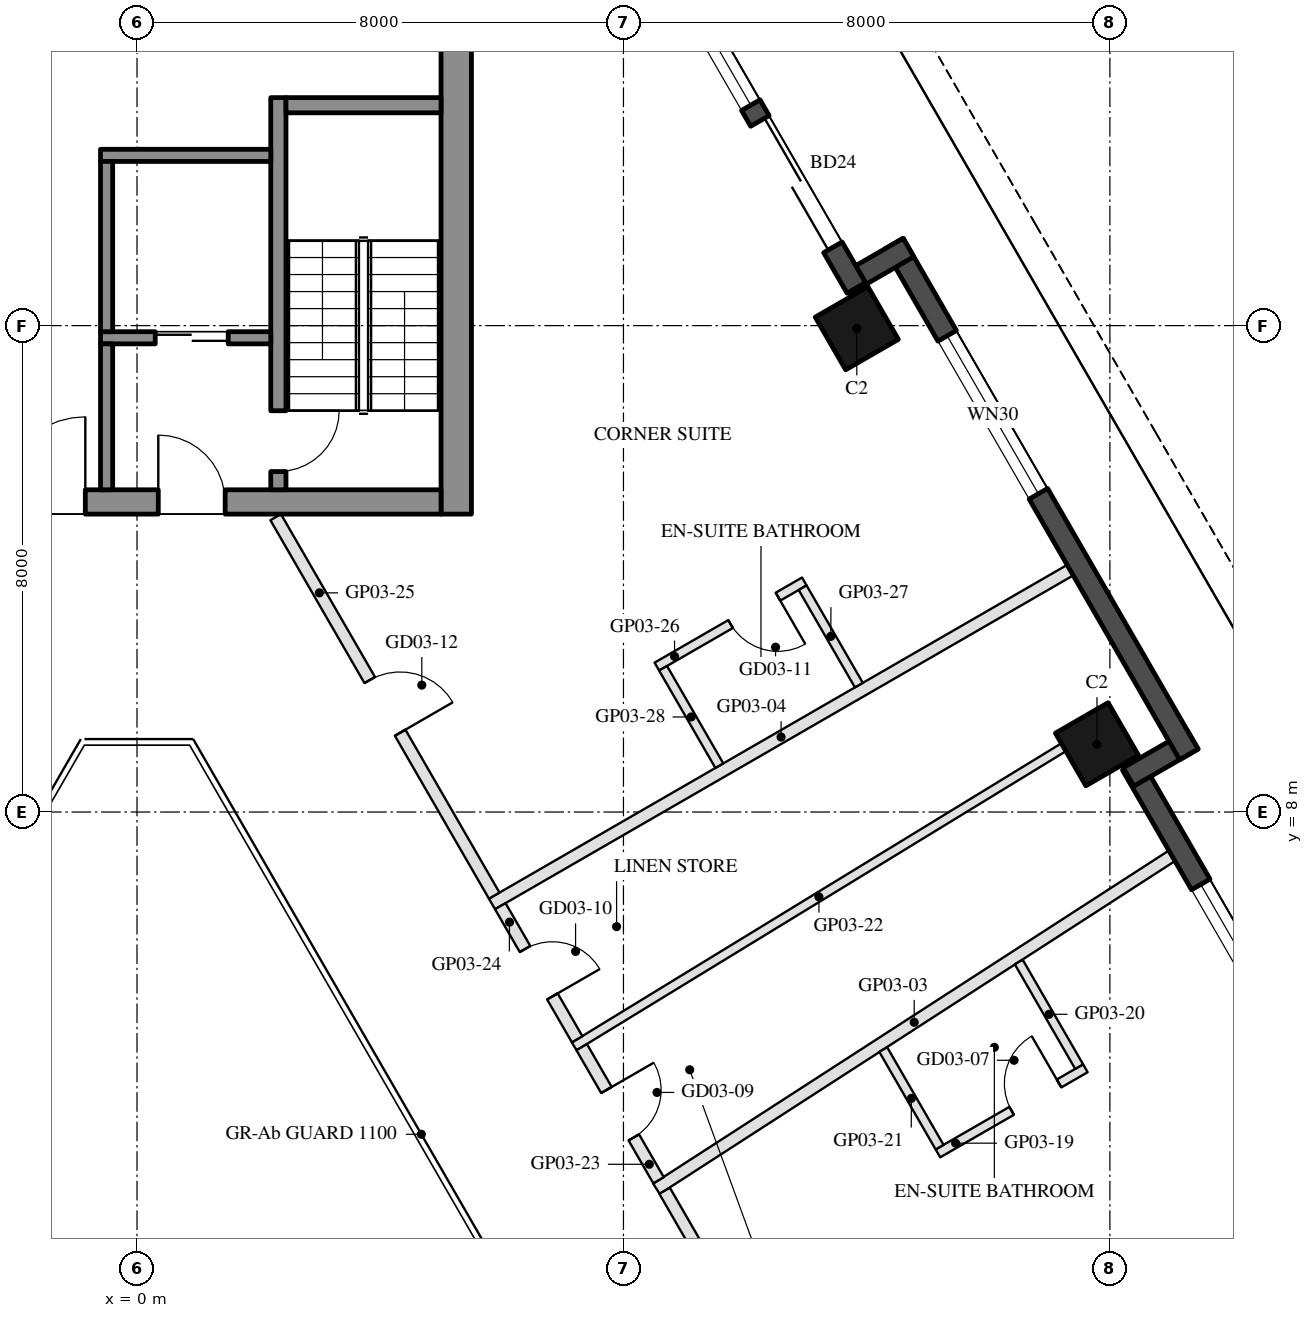
"""IFC4 building model, lengths in metres.
Left out: names, types, materials, properties, quantities, classifications, styles, units other than length and angle.
Written with IfcOpenShell. Run it as: python <this file> out.ifc"""

import sys

from ifc_helpers import new_model, si_unit, direction, frame, frame_2d, origin, origin_2d, place, context, subcontext, project, spatial, rectangle, hollow_rectangle, extrude, element, fill, save


model = new_model("IFC4")
c1 = context("Model", 3, precision=1e-05, world=origin(), true_north=direction((0.0, 1.0)))
c2 = subcontext(c1, "Body", "Model", "MODEL_VIEW")
j1 = project(units=[si_unit("LENGTHUNIT", "METRE"), si_unit("PLANEANGLEUNIT", "RADIAN")], contexts=[c1])
p1 = place(None, origin())
s1 = spatial("IfcSite", under=j1, at=p1, CompositionType="ELEMENT")
p2 = place(p1, origin())
s2 = spatial("IfcBuilding", under=s1, at=p2, CompositionType="ELEMENT")
p3 = place(p2, frame((0.0, 0.0, 65.0)))
s3 = spatial("IfcBuildingStorey", under=s2, at=p3, CompositionType="ELEMENT", Elevation=65.0)
for number, where, z_axis, x_axis in (
    (1, (15.788, 9.115, 0.0), (0.0, 0.0, 1.0), (-0.5, 0.866, 0.0)),
    (2, (11.838, 15.957, 0.0), (0.0, 0.0, 1.0), (-0.5, 0.866, 0.0)),
):
    element("IfcColumn", number, at=place(p3, frame(where, z_axis=z_axis, x_axis=x_axis)), inside=s3, PredefinedType="COLUMN", context=c2, shape_type="SweptSolid", body=[
        extrude(hollow_rectangle(XDim=1.0, YDim=1.0, WallThickness=0.045, at=origin_2d()), origin(), (0.0, 0.0, 1.0), 3.7),
    ])
p4 = place(p3, frame((19.729, 2.938, 0.0), z_axis=(0.0, 0.0, 1.0), x_axis=(-0.499976430342, 0.866039011305, 0.0)))
e3 = element("IfcWall", 3, at=p4, inside=s3, PredefinedType="SOLIDWALL", context=c2, shape_type="SweptSolid", body=[
    extrude(rectangle(XDim=6.74, YDim=0.35, at=frame_2d((3.37, 0.0))), origin(), (0.0, 0.0, 1.0), 3.55),
])
p5 = place(p4, frame((0.77, 0.0, 0.3)))
e4 = element("IfcOpeningElement", 4, at=p5, cuts=e3, PredefinedType="OPENING", context=c2, shape_type="SweptSolid", body=[
    extrude(rectangle(XDim=1.7, YDim=2.65, at=frame_2d((0.85, 1.325))), frame((0.0, 0.185, 0.0), z_axis=(0.0, -1.0, 0.0), x_axis=(1.0, 0.0, 0.0)), (0.0, 0.0, 1.0), 0.37),
])
p6 = place(p4, frame((2.77, 0.0, 0.3)))
e5 = element("IfcOpeningElement", 5, at=p6, cuts=e3, PredefinedType="OPENING", context=c2, shape_type="SweptSolid", body=[
    extrude(rectangle(XDim=1.7, YDim=2.65, at=frame_2d((0.85, 1.325))), frame((0.0, 0.185, 0.0), z_axis=(0.0, -1.0, 0.0), x_axis=(1.0, 0.0, 0.0)), (0.0, 0.0, 1.0), 0.37),
])
p7 = place(p3, frame((16.306, 8.577, 0.0), z_axis=(0.0, 0.0, 1.0), x_axis=(0.866092288191, 0.499884134912, 0.0)))
e6 = element("IfcWall", 6, at=p7, inside=s3, PredefinedType="SOLIDWALL", context=c2, shape_type="SweptSolid", body=[
    extrude(rectangle(XDim=1.22, YDim=0.35, at=frame_2d((0.61, 0.0))), origin(), (0.0, 0.0, 1.0), 3.55),
])
p8 = place(p3, frame((17.299, 8.948, 0.0), z_axis=(0.0, 0.0, 1.0), x_axis=(-0.500010041276, 0.866019606374, 0.0)))
e7 = element("IfcWall", 7, at=p8, inside=s3, PredefinedType="SOLIDWALL", context=c2, shape_type="SweptSolid", body=[
    extrude(rectangle(XDim=9.7, YDim=0.35, at=frame_2d((4.85, 0.0))), origin(), (0.0, 0.0, 1.0), 3.55),
])
p9 = place(p8, frame((4.949, 0.0, 0.3)))
e8 = element("IfcOpeningElement", 8, at=p9, cuts=e7, PredefinedType="OPENING", context=c2, shape_type="SweptSolid", body=[
    extrude(rectangle(XDim=3.0, YDim=2.65, at=frame_2d((1.5, 1.325))), frame((0.0, 0.185, 0.0), z_axis=(0.0, -1.0, 0.0), x_axis=(1.0, 0.0, 0.0)), (0.0, 0.0, 1.0), 0.37),
])
p10 = place(p3, frame((12.688, 17.284, 0.0), z_axis=(0.0, 0.0, 1.0), x_axis=(-0.865955602162, -0.500120880472, 0.0)))
e9 = element("IfcWall", 9, at=p10, inside=s3, PredefinedType="SOLIDWALL", context=c2, shape_type="SweptSolid", body=[
    extrude(rectangle(XDim=1.22, YDim=0.35, at=frame_2d((0.61, 0.0))), origin(), (0.0, 0.0, 1.0), 3.55),
])
p11 = place(p3, frame((11.829, 16.621, 0.0), z_axis=(0.0, 0.0, 1.0), x_axis=(-0.500003597184, 0.866023326939, 0.0)))
e10 = element("IfcWall", 10, at=p11, inside=s3, PredefinedType="SOLIDWALL", context=c2, shape_type="SweptSolid", body=[
    extrude(rectangle(XDim=6.74, YDim=0.35, at=frame_2d((3.37, 0.0))), origin(), (0.0, 0.0, 1.0), 3.55),
])
p12 = place(p11, frame((0.77, 0.0, 0.0)))
e11 = element("IfcOpeningElement", 11, at=p12, cuts=e10, PredefinedType="OPENING", context=c2, shape_type="SweptSolid", body=[
    extrude(rectangle(XDim=2.4, YDim=2.4, at=frame_2d((1.2, 1.2))), frame((0.0, 0.185, 0.0), z_axis=(0.0, -1.0, 0.0), x_axis=(1.0, 0.0, 0.0)), (0.0, 0.0, 1.0), 0.37),
])
p13 = place(p11, frame((3.47, 0.0, 0.3)))
e12 = element("IfcOpeningElement", 12, at=p13, cuts=e10, PredefinedType="OPENING", context=c2, shape_type="SweptSolid", body=[
    extrude(rectangle(XDim=2.9, YDim=2.65, at=frame_2d((1.45, 1.325))), frame((0.0, 0.185, 0.0), z_axis=(0.0, -1.0, 0.0), x_axis=(1.0, 0.0, 0.0)), (0.0, 0.0, 1.0), 0.37),
])
p14 = place(p3, frame((5.25, 12.9, 0.0), z_axis=(0.0, 0.0, 1.0), x_axis=(0.0, 1.0, 0.0)))
e13 = element("IfcWall", 13, at=p14, inside=s3, PredefinedType="SHEAR", context=c2, shape_type="SweptSolid", body=[
    extrude(rectangle(XDim=14.837, YDim=0.5, at=frame_2d((7.418, 0.0))), origin(), (0.0, 0.0, 1.0), 3.5),
])
p15 = place(p3, frame((5.0, 13.1, 0.0), z_axis=(0.0, 0.0, 1.0), x_axis=(-1.0, 0.0, 0.0)))
e14 = element("IfcWall", 14, at=p15, inside=s3, PredefinedType="SHEAR", context=c2, shape_type="SweptSolid", body=[
    extrude(rectangle(XDim=10.0, YDim=0.4, at=frame_2d((5.0, 0.0))), origin(), (0.0, 0.0, 1.0), 3.5),
])
p16 = place(p15, frame((3.55, 0.0, 0.0)))
e15 = element("IfcOpeningElement", 15, at=p16, cuts=e14, PredefinedType="OPENING", context=c2, shape_type="SweptSolid", body=[
    extrude(rectangle(XDim=1.1, YDim=2.1, at=frame_2d((0.55, 1.05))), frame((0.0, 0.21, 0.0), z_axis=(0.0, -1.0, 0.0), x_axis=(1.0, 0.0, 0.0)), (0.0, 0.0, 1.0), 0.42),
])
p17 = place(p15, frame((5.85, 0.0, 0.0)))
e16 = element("IfcOpeningElement", 16, at=p17, cuts=e14, PredefinedType="OPENING", context=c2, shape_type="SweptSolid", body=[
    extrude(rectangle(XDim=1.4, YDim=2.1, at=frame_2d((0.7, 1.05))), frame((0.0, 0.21, 0.0), z_axis=(0.0, -1.0, 0.0), x_axis=(1.0, 0.0, 0.0)), (0.0, 0.0, 1.0), 0.42),
])
p18 = place(p3, frame((2.325, 13.3, 0.0), z_axis=(0.0, 0.0, 1.0), x_axis=(0.0, 1.0, 0.0)))
e17 = element("IfcWall", 17, at=p18, inside=s3, PredefinedType="SHEAR", context=c2, shape_type="SweptSolid", body=[
    extrude(rectangle(XDim=6.45, YDim=0.25, at=frame_2d((3.225, 0.0))), origin(), (0.0, 0.0, 1.0), 3.5),
])
p19 = place(p18, frame((0.3, 0.0, 0.0)))
e18 = element("IfcOpeningElement", 18, at=p19, cuts=e17, PredefinedType="OPENING", context=c2, shape_type="SweptSolid", body=[
    extrude(rectangle(XDim=1.0, YDim=2.1, at=frame_2d((0.5, 1.05))), frame((0.0, 0.135, 0.0), z_axis=(0.0, -1.0, 0.0), x_axis=(1.0, 0.0, 0.0)), (0.0, 0.0, 1.0), 0.27),
])
p20 = place(p3, frame((5.0, 19.625, 0.0), z_axis=(0.0, 0.0, 1.0), x_axis=(-1.0, 0.0, 0.0)))
e19 = element("IfcWall", 19, at=p20, inside=s3, PredefinedType="SHEAR", context=c2, shape_type="SweptSolid", body=[
    extrude(rectangle(XDim=2.55, YDim=0.25, at=frame_2d((1.275, 0.0))), origin(), (0.0, 0.0, 1.0), 3.5),
])
p21 = place(p3, frame((2.2, 18.8, 0.0), z_axis=(0.0, 0.0, 1.0), x_axis=(-1.0, 0.0, 0.0)))
e20 = element("IfcWall", 20, at=p21, inside=s3, PredefinedType="SHEAR", context=c2, shape_type="SweptSolid", body=[
    extrude(rectangle(XDim=2.8, YDim=0.2, at=frame_2d((1.4, 0.0))), origin(), (0.0, 0.0, 1.0), 3.5),
])
p22 = place(p3, frame((2.2, 15.8, 0.0), z_axis=(0.0, 0.0, 1.0), x_axis=(-1.0, 0.0, 0.0)))
e21 = element("IfcWall", 21, at=p22, inside=s3, PredefinedType="SHEAR", context=c2, shape_type="SweptSolid", body=[
    extrude(rectangle(XDim=2.8, YDim=0.2, at=frame_2d((1.4, 0.0))), origin(), (0.0, 0.0, 1.0), 3.5),
])
p23 = place(p22, frame((0.7, 0.0, 0.0)))
e22 = element("IfcOpeningElement", 22, at=p23, cuts=e21, PredefinedType="OPENING", context=c2, shape_type="SweptSolid", body=[
    extrude(rectangle(XDim=1.2, YDim=2.1, at=frame_2d((0.6, 1.05))), frame((0.0, 0.11, 0.0), z_axis=(0.0, -1.0, 0.0), x_axis=(1.0, 0.0, 0.0)), (0.0, 0.0, 1.0), 0.22),
])
p24 = place(p3, frame((-0.5, 15.9, 0.0), z_axis=(0.0, 0.0, 1.0), x_axis=(0.0, 1.0, 0.0)))
e23 = element("IfcWall", 23, at=p24, inside=s3, PredefinedType="SHEAR", context=c2, shape_type="SweptSolid", body=[
    extrude(rectangle(XDim=2.8, YDim=0.2, at=frame_2d((1.4, 0.0))), origin(), (0.0, 0.0, 1.0), 3.5),
])
p25 = place(p3, frame((-0.5, 13.3, 0.0), z_axis=(0.0, 0.0, 1.0), x_axis=(0.0, 1.0, 0.0)))
e24 = element("IfcWall", 24, at=p25, inside=s3, PredefinedType="SHEAR", context=c2, shape_type="SweptSolid", body=[
    extrude(rectangle(XDim=2.4, YDim=0.2, at=frame_2d((1.2, 0.0))), origin(), (0.0, 0.0, 1.0), 3.5),
])
p26 = place(p3, frame((17.02, 7.28, 0.0), z_axis=(0.0, 0.0, 1.0), x_axis=(-0.839924980805, -0.542702521294, 0.0)))
e25 = element("IfcWall", 25, at=p26, inside=s3, PredefinedType="PARTITIONING", context=c2, shape_type="SweptSolid", body=[
    extrude(rectangle(XDim=10.093, YDim=0.2, at=frame_2d((5.046, 0.0))), origin(), (0.0, 0.0, 1.0), 2.96),
])
p27 = place(p3, frame((15.347, 11.978, 0.0), z_axis=(0.0, 0.0, 1.0), x_axis=(-0.866027479907, -0.499996404033, 0.0)))
e26 = element("IfcWall", 26, at=p27, inside=s3, PredefinedType="PARTITIONING", context=c2, shape_type="SweptSolid", body=[
    extrude(rectangle(XDim=10.98, YDim=0.2, at=frame_2d((5.49, 0.0))), origin(), (0.0, 0.0, 1.0), 2.96),
])
p28 = place(p3, frame((8.677, 1.771, 0.0), z_axis=(0.0, 0.0, 1.0), x_axis=(0.50000293509, -0.866023709203, 0.0)))
e27 = element("IfcWall", 27, at=p28, inside=s3, PredefinedType="PARTITIONING", context=c2, shape_type="SweptSolid", body=[
    extrude(rectangle(XDim=7.183, YDim=0.2, at=frame_2d((3.592, 0.0))), origin(), (0.0, 0.0, 1.0), 2.95),
])
p29 = place(p28, frame((3.092, 0.0, 0.0)))
e28 = element("IfcOpeningElement", 28, at=p29, cuts=e27, PredefinedType="OPENING", context=c2, shape_type="SweptSolid", body=[
    extrude(rectangle(XDim=1.0, YDim=2.1, at=frame_2d((0.5, 1.05))), frame((0.0, 0.11, 0.0), z_axis=(0.0, -1.0, 0.0), x_axis=(1.0, 0.0, 0.0)), (0.0, 0.0, 1.0), 0.22),
])
p30 = place(p3, frame((13.172, 2.386, 0.0), z_axis=(0.0, 0.0, 1.0), x_axis=(0.865996816683, 0.500049511043, 0.0)))
e29 = element("IfcWall", 29, at=p30, inside=s3, PredefinedType="PARTITIONING", context=c2, shape_type="SweptSolid", body=[
    extrude(rectangle(XDim=2.8, YDim=0.15, at=frame_2d((1.4, 0.0))), origin(), (0.0, 0.0, 1.0), 3.55),
])
p31 = place(p30, frame((1.4, 0.0, 0.0)))
e30 = element("IfcOpeningElement", 30, at=p31, cuts=e29, PredefinedType="OPENING", context=c2, shape_type="SweptSolid", body=[
    extrude(rectangle(XDim=0.9, YDim=2.1, at=frame_2d((0.45, 1.05))), frame((0.0, 0.085, 0.0), z_axis=(0.0, -1.0, 0.0), x_axis=(1.0, 0.0, 0.0)), (0.0, 0.0, 1.0), 0.17),
])
p32 = place(p3, frame((15.494, 3.813, 0.0), z_axis=(0.0, 0.0, 1.0), x_axis=(-0.499945861543, 0.866056658381, 0.0)))
e31 = element("IfcWall", 31, at=p32, inside=s3, PredefinedType="PARTITIONING", context=c2, shape_type="SweptSolid", body=[
    extrude(rectangle(XDim=1.987, YDim=0.15, at=frame_2d((0.993, 0.0))), origin(), (0.0, 0.0, 1.0), 2.95),
])
p33 = place(p3, frame((13.199, 2.488, 0.0), z_axis=(0.0, 0.0, 1.0), x_axis=(-0.499992292652, 0.866029853578, 0.0)))
e32 = element("IfcWall", 32, at=p33, inside=s3, PredefinedType="PARTITIONING", context=c2, shape_type="SweptSolid", body=[
    extrude(rectangle(XDim=1.854, YDim=0.15, at=frame_2d((0.927, 0.0))), origin(), (0.0, 0.0, 1.0), 2.95),
])
p34 = place(p3, frame((15.239, 9.065, 0.0), z_axis=(0.0, 0.0, 1.0), x_axis=(-0.853241525467, -0.521515962573, 0.0)))
e33 = element("IfcWall", 33, at=p34, inside=s3, PredefinedType="PARTITIONING", context=c2, shape_type="SweptSolid", body=[
    extrude(rectangle(XDim=9.433, YDim=0.15, at=frame_2d((4.716, 0.0))), origin(), (0.0, 0.0, 1.0), 2.95),
])
p35 = place(p3, frame((7.313, 4.133, 0.0), z_axis=(0.0, 0.0, 1.0), x_axis=(0.500003972934, -0.866023109998, 0.0)))
e34 = element("IfcWall", 34, at=p35, inside=s3, PredefinedType="PARTITIONING", context=c2, shape_type="SweptSolid", body=[
    extrude(rectangle(XDim=2.527, YDim=0.2, at=frame_2d((1.264, 0.0))), origin(), (0.0, 0.0, 1.0), 2.95),
])
p36 = place(p35, frame((0.814, 0.0, 0.0)))
e35 = element("IfcOpeningElement", 35, at=p36, cuts=e34, PredefinedType="OPENING", context=c2, shape_type="SweptSolid", body=[
    extrude(rectangle(XDim=0.9, YDim=2.1, at=frame_2d((0.45, 1.05))), frame((0.0, 0.11, 0.0), z_axis=(0.0, -1.0, 0.0), x_axis=(1.0, 0.0, 0.0)), (0.0, 0.0, 1.0), 0.22),
])
p37 = place(p3, frame((5.975, 6.452, 0.0), z_axis=(0.0, 0.0, 1.0), x_axis=(0.499962146402, -0.866047257466, 0.0)))
e36 = element("IfcWall", 36, at=p37, inside=s3, PredefinedType="PARTITIONING", context=c2, shape_type="SweptSolid", body=[
    extrude(rectangle(XDim=2.528, YDim=0.2, at=frame_2d((1.264, 0.0))), origin(), (0.0, 0.0, 1.0), 2.95),
])
p38 = place(p37, frame((0.814, 0.0, 0.0)))
e37 = element("IfcOpeningElement", 37, at=p38, cuts=e36, PredefinedType="OPENING", context=c2, shape_type="SweptSolid", body=[
    extrude(rectangle(XDim=0.9, YDim=2.1, at=frame_2d((0.45, 1.05))), frame((0.0, 0.11, 0.0), z_axis=(0.0, -1.0, 0.0), x_axis=(1.0, 0.0, 0.0)), (0.0, 0.0, 1.0), 0.22),
])
p39 = place(p3, frame((2.281, 12.85, 0.0), z_axis=(0.0, 0.0, 1.0), x_axis=(0.499992939664, -0.866029480033, 0.0)))
e38 = element("IfcWall", 38, at=p39, inside=s3, PredefinedType="PARTITIONING", context=c2, shape_type="SweptSolid", body=[
    extrude(rectangle(XDim=7.188, YDim=0.2, at=frame_2d((3.594, 0.0))), origin(), (0.0, 0.0, 1.0), 2.95),
])
p40 = place(p39, frame((3.094, 0.0, 0.0)))
e39 = element("IfcOpeningElement", 39, at=p40, cuts=e38, PredefinedType="OPENING", context=c2, shape_type="SweptSolid", body=[
    extrude(rectangle(XDim=1.0, YDim=2.1, at=frame_2d((0.5, 1.05))), frame((0.0, 0.11, 0.0), z_axis=(0.0, -1.0, 0.0), x_axis=(1.0, 0.0, 0.0)), (0.0, 0.0, 1.0), 0.22),
])
p41 = place(p3, frame((10.974, 11.792, 0.0), z_axis=(0.0, 0.0, 1.0), x_axis=(-0.866056369097, -0.49994636267, 0.0)))
e40 = element("IfcWall", 40, at=p41, inside=s3, PredefinedType="PARTITIONING", context=c2, shape_type="SweptSolid", body=[
    extrude(rectangle(XDim=2.8, YDim=0.15, at=frame_2d((1.4, 0.0))), origin(), (0.0, 0.0, 1.0), 3.55),
])
p42 = place(p41, frame((0.5, 0.0, 0.0)))
e41 = element("IfcOpeningElement", 41, at=p42, cuts=e40, PredefinedType="OPENING", context=c2, shape_type="SweptSolid", body=[
    extrude(rectangle(XDim=0.9, YDim=2.1, at=frame_2d((0.45, 1.05))), frame((0.0, 0.085, 0.0), z_axis=(0.0, -1.0, 0.0), x_axis=(1.0, 0.0, 0.0)), (0.0, 0.0, 1.0), 0.17),
])
for number, where, z_axis, x_axis in (
    (42, (11.872, 10.087, 0.0), (0.0, 0.0, 1.0), (-0.5, 0.866, 0.0)),
    (43, (9.577, 8.762, 0.0), (0.0, 0.0, 1.0), (-0.5, 0.866, 0.0)),
):
    element("IfcWall", number, at=place(p3, frame(where, z_axis=z_axis, x_axis=x_axis)), inside=s3, PredefinedType="PARTITIONING", context=c2, shape_type="SweptSolid", body=[
        extrude(rectangle(XDim=1.85, YDim=0.15, at=frame_2d((0.925, 0.0))), origin(), (0.0, 0.0, 1.0), 2.95),
    ])
p43 = place(p6, origin())
e44 = element("IfcWindow", 44, at=p43, inside=s3, PartitioningType="SINGLE_PANEL", PredefinedType="WINDOW", context=c2, shape_type="SweptSolid", body=[
    extrude(rectangle(XDim=1.7, YDim=2.65, at=frame_2d((0.85, 1.325))), frame((0.0, 0.03, 0.0), z_axis=(0.0, -1.0, 0.0), x_axis=(1.0, 0.0, 0.0)), (0.0, 0.0, 1.0), 0.06),
])
fill(e5, e44)
p44 = place(p9, origin())
e45 = element("IfcWindow", 45, at=p44, inside=s3, PartitioningType="SINGLE_PANEL", PredefinedType="WINDOW", context=c2, shape_type="SweptSolid", body=[
    extrude(rectangle(XDim=3.0, YDim=2.65, at=frame_2d((1.5, 1.325))), frame((0.0, 0.03, 0.0), z_axis=(0.0, -1.0, 0.0), x_axis=(1.0, 0.0, 0.0)), (0.0, 0.0, 1.0), 0.06),
])
fill(e8, e45)
p45 = place(p12, frame((2.4, 0.0, 0.0), z_axis=(0.0, 0.0, 1.0), x_axis=(-1.0, 0.0, 0.0)))
e46 = element("IfcDoor", 46, at=p45, inside=s3, OperationType="SLIDING_TO_LEFT", PredefinedType="DOOR", context=c2, shape_type="SweptSolid", body=[
    extrude(rectangle(XDim=2.4, YDim=2.4, at=frame_2d((1.2, 1.2))), frame((0.0, 0.025, 0.0), z_axis=(0.0, -1.0, 0.0), x_axis=(1.0, 0.0, 0.0)), (0.0, 0.0, 1.0), 0.05),
])
fill(e11, e46)
p46 = place(p13, origin())
e47 = element("IfcWindow", 47, at=p46, inside=s3, PartitioningType="SINGLE_PANEL", PredefinedType="WINDOW", context=c2, shape_type="SweptSolid", body=[
    extrude(rectangle(XDim=2.9, YDim=2.65, at=frame_2d((1.45, 1.325))), frame((0.0, 0.03, 0.0), z_axis=(0.0, -1.0, 0.0), x_axis=(1.0, 0.0, 0.0)), (0.0, 0.0, 1.0), 0.06),
])
fill(e12, e47)
p47 = place(p23, origin())
e48 = element("IfcDoor", 48, at=p47, inside=s3, OperationType="DOUBLE_DOOR_SLIDING", PredefinedType="DOOR", context=c2, shape_type="SweptSolid", body=[
    extrude(rectangle(XDim=1.2, YDim=2.1, at=frame_2d((0.6, 1.05))), frame((0.0, 0.025, 0.0), z_axis=(0.0, -1.0, 0.0), x_axis=(1.0, 0.0, 0.0)), (0.0, 0.0, 1.0), 0.05),
])
fill(e22, e48)
p48 = place(p16, frame((1.1, 0.0, 0.0), z_axis=(0.0, 0.0, 1.0), x_axis=(-1.0, 0.0, 0.0)))
e49 = element("IfcDoor", 49, at=p48, inside=s3, OperationType="SINGLE_SWING_LEFT", PredefinedType="DOOR", context=c2, shape_type="SweptSolid", body=[
    extrude(rectangle(XDim=1.1, YDim=2.1, at=frame_2d((0.55, 1.05))), frame((0.0, 0.025, 0.0), z_axis=(0.0, -1.0, 0.0), x_axis=(1.0, 0.0, 0.0)), (0.0, 0.0, 1.0), 0.05),
])
fill(e15, e49)
p49 = place(p17, frame((1.4, 0.0, 0.0), z_axis=(0.0, 0.0, 1.0), x_axis=(-1.0, 0.0, 0.0)))
e50 = element("IfcDoor", 50, at=p49, inside=s3, OperationType="DOUBLE_DOOR_SINGLE_SWING", PredefinedType="DOOR", context=c2, shape_type="SweptSolid", body=[
    extrude(rectangle(XDim=1.4, YDim=2.1, at=frame_2d((0.7, 1.05))), frame((0.0, 0.025, 0.0), z_axis=(0.0, -1.0, 0.0), x_axis=(1.0, 0.0, 0.0)), (0.0, 0.0, 1.0), 0.05),
])
fill(e16, e50)
p50 = place(p19, frame((1.0, 0.0, 0.0), z_axis=(0.0, 0.0, 1.0), x_axis=(-1.0, 0.0, 0.0)))
e51 = element("IfcDoor", 51, at=p50, inside=s3, OperationType="SINGLE_SWING_LEFT", PredefinedType="DOOR", context=c2, shape_type="SweptSolid", body=[
    extrude(rectangle(XDim=1.0, YDim=2.1, at=frame_2d((0.5, 1.05))), frame((0.0, 0.025, 0.0), z_axis=(0.0, -1.0, 0.0), x_axis=(1.0, 0.0, 0.0)), (0.0, 0.0, 1.0), 0.05),
])
fill(e18, e51)
p51 = place(p31, origin())
e52 = element("IfcDoor", 52, at=p51, inside=s3, OperationType="SINGLE_SWING_RIGHT", PredefinedType="DOOR", context=c2, shape_type="SweptSolid", body=[
    extrude(rectangle(XDim=0.9, YDim=2.1, at=frame_2d((0.45, 1.05))), frame((0.0, 0.025, 0.0), z_axis=(0.0, -1.0, 0.0), x_axis=(1.0, 0.0, 0.0)), (0.0, 0.0, 1.0), 0.05),
])
fill(e30, e52)
p52 = place(p36, origin())
e53 = element("IfcDoor", 53, at=p52, inside=s3, OperationType="SINGLE_SWING_LEFT", PredefinedType="DOOR", context=c2, shape_type="SweptSolid", body=[
    extrude(rectangle(XDim=0.9, YDim=2.1, at=frame_2d((0.45, 1.05))), frame((0.0, 0.025, 0.0), z_axis=(0.0, -1.0, 0.0), x_axis=(1.0, 0.0, 0.0)), (0.0, 0.0, 1.0), 0.05),
])
fill(e35, e53)
p53 = place(p38, origin())
e54 = element("IfcDoor", 54, at=p53, inside=s3, OperationType="SINGLE_SWING_RIGHT", PredefinedType="DOOR", context=c2, shape_type="SweptSolid", body=[
    extrude(rectangle(XDim=0.9, YDim=2.1, at=frame_2d((0.45, 1.05))), frame((0.0, 0.025, 0.0), z_axis=(0.0, -1.0, 0.0), x_axis=(1.0, 0.0, 0.0)), (0.0, 0.0, 1.0), 0.05),
])
fill(e37, e54)
p54 = place(p42, origin())
e55 = element("IfcDoor", 55, at=p54, inside=s3, OperationType="SINGLE_SWING_LEFT", PredefinedType="DOOR", context=c2, shape_type="SweptSolid", body=[
    extrude(rectangle(XDim=0.9, YDim=2.1, at=frame_2d((0.45, 1.05))), frame((0.0, 0.025, 0.0), z_axis=(0.0, -1.0, 0.0), x_axis=(1.0, 0.0, 0.0)), (0.0, 0.0, 1.0), 0.05),
])
fill(e41, e55)
p55 = place(p40, origin())
e56 = element("IfcDoor", 56, at=p55, inside=s3, OperationType="SINGLE_SWING_RIGHT", PredefinedType="DOOR", context=c2, shape_type="SweptSolid", body=[
    extrude(rectangle(XDim=1.0, YDim=2.1, at=frame_2d((0.5, 1.05))), frame((0.0, 0.025, 0.0), z_axis=(0.0, -1.0, 0.0), x_axis=(1.0, 0.0, 0.0)), (0.0, 0.0, 1.0), 0.05),
])
fill(e39, e56)
save(model, sys.argv[1])
